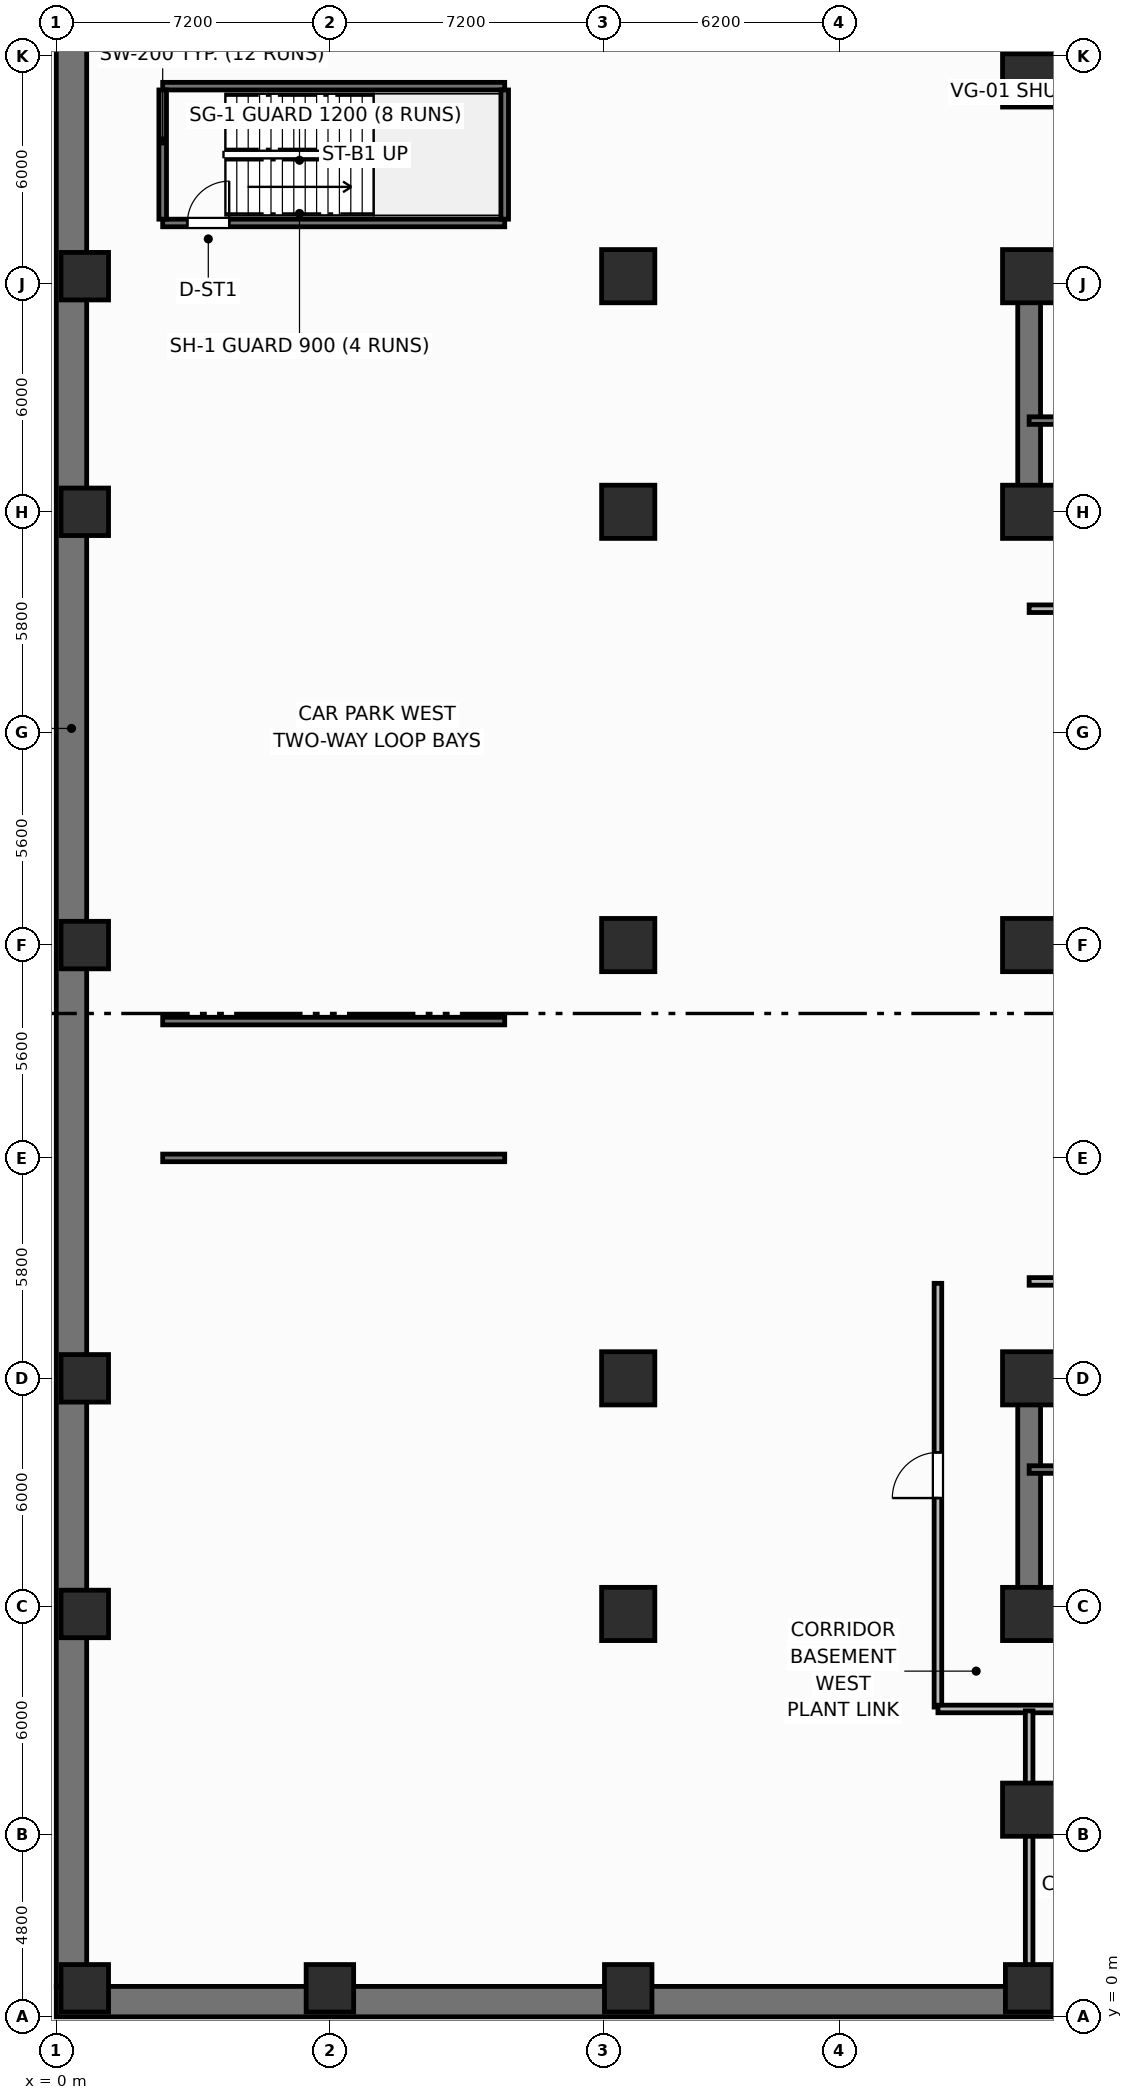
"""IFC4 building model, lengths in metres.
Left out: names, types, materials, properties, quantities, classifications, styles, units other than length and angle.
Written with IfcOpenShell. Run it as: python <this file> out.ifc"""

import sys

from ifc_helpers import new_model, si_unit, direction, frame, frame_2d, origin, origin_2d, place, context, subcontext, project, spatial, rectangle, extrude, element, fill, save


model = new_model("IFC4")
c1 = context("Model", 3, precision=1e-05, world=origin(), true_north=direction((0.0, 1.0)))
c2 = subcontext(c1, "Body", "Model", "MODEL_VIEW")
j1 = project(units=[si_unit("LENGTHUNIT", "METRE"), si_unit("PLANEANGLEUNIT", "RADIAN")], contexts=[c1])
p1 = place(None, origin())
s1 = spatial("IfcSite", under=j1, at=p1, CompositionType="ELEMENT")
p2 = place(p1, origin())
s2 = spatial("IfcBuilding", under=s1, at=p2, CompositionType="ELEMENT")
p3 = place(p2, frame((0.0, 0.0, -4.8)))
s3 = spatial("IfcBuildingStorey", under=s2, at=p3, CompositionType="ELEMENT", Elevation=-4.8)
p4 = place(p3, frame((0.0, 0.4, 0.0), z_axis=(0.0, 0.0, 1.0), x_axis=(1.0, 0.0, 0.0)))
e1 = element("IfcWall", 1, at=p4, inside=s3, PredefinedType="USERDEFINED", context=c2, shape_type="SweptSolid", body=[
    extrude(rectangle(XDim=78.4, YDim=0.8, at=frame_2d((39.2, 0.0))), origin(), (0.0, 0.0, 1.0), 4.8),
])
p5 = place(p3, frame((0.4, 0.8, 0.0), z_axis=(0.0, 0.0, 1.0), x_axis=(0.0, 1.0, 0.0)))
e2 = element("IfcWall", 2, at=p5, inside=s3, PredefinedType="USERDEFINED", context=c2, shape_type="SweptSolid", body=[
    extrude(rectangle(XDim=54.8, YDim=0.8, at=frame_2d((27.4, 0.0))), origin(), (0.0, 0.0, 1.0), 4.8),
])
p6 = place(p3, frame((52.8, 10.6, 0.0), z_axis=(0.0, 0.0, 1.0), x_axis=(-1.0, 0.0, 0.0)))
e3 = element("IfcWall", 3, at=p6, inside=s3, PredefinedType="SHEAR", context=c2, shape_type="SweptSolid", body=[
    extrude(rectangle(XDim=27.2, YDim=0.6, at=frame_2d((13.6, 0.0))), origin(), (0.0, 0.0, 1.0), 4.8),
])
p7 = place(p3, frame((25.6, 10.9, 0.0), z_axis=(0.0, 0.0, 1.0), x_axis=(0.0, 1.0, 0.0)))
e4 = element("IfcWall", 4, at=p7, inside=s3, PredefinedType="SHEAR", context=c2, shape_type="SweptSolid", body=[
    extrude(rectangle(XDim=5.6, YDim=0.6, at=frame_2d((2.8, 0.0))), origin(), (0.0, 0.0, 1.0), 4.8),
])
p8 = place(p3, frame((25.6, 16.8, 0.0), z_axis=(0.0, 0.0, 1.0), x_axis=(1.0, 0.0, 0.0)))
e5 = element("IfcWall", 5, at=p8, inside=s3, PredefinedType="SHEAR", context=c2, shape_type="SweptSolid", body=[
    extrude(rectangle(XDim=27.2, YDim=0.6, at=frame_2d((13.6, 0.0))), origin(), (0.0, 0.0, 1.0), 4.8),
])
p9 = place(p8, frame((1.9, 0.0, 0.0)))
e6 = element("IfcOpeningElement", 6, at=p9, cuts=e5, PredefinedType="OPENING", context=c2, shape_type="SweptSolid", body=[
    extrude(rectangle(XDim=1.1, YDim=2.15, at=frame_2d((0.55, 1.075))), frame((0.0, 0.31, 0.0), z_axis=(0.0, -1.0, 0.0), x_axis=(1.0, 0.0, 0.0)), (0.0, 0.0, 1.0), 0.62),
])
p10 = place(p8, frame((13.0, 0.0, 0.0)))
e7 = element("IfcOpeningElement", 7, at=p10, cuts=e5, PredefinedType="OPENING", context=c2, shape_type="SweptSolid", body=[
    extrude(rectangle(XDim=1.2, YDim=2.15, at=frame_2d((0.6, 1.075))), frame((0.0, 0.31, 0.0), z_axis=(0.0, -1.0, 0.0), x_axis=(1.0, 0.0, 0.0)), (0.0, 0.0, 1.0), 0.62),
])
p11 = place(p8, frame((20.4, 0.0, 0.0)))
e8 = element("IfcOpeningElement", 8, at=p11, cuts=e5, PredefinedType="OPENING", context=c2, shape_type="SweptSolid", body=[
    extrude(rectangle(XDim=1.3, YDim=2.2, at=frame_2d((0.65, 1.1))), frame((0.0, 0.31, 0.0), z_axis=(0.0, -1.0, 0.0), x_axis=(1.0, 0.0, 0.0)), (0.0, 0.0, 1.0), 0.62),
])
p12 = place(p8, frame((24.65, 0.0, 0.0)))
e9 = element("IfcOpeningElement", 9, at=p12, cuts=e5, PredefinedType="OPENING", context=c2, shape_type="SweptSolid", body=[
    extrude(rectangle(XDim=0.85, YDim=2.1, at=frame_2d((0.425, 1.05))), frame((0.0, 0.31, 0.0), z_axis=(0.0, -1.0, 0.0), x_axis=(1.0, 0.0, 0.0)), (0.0, 0.0, 1.0), 0.62),
])
p13 = place(p3, frame((25.6, 45.8, 0.0), z_axis=(0.0, 0.0, 1.0), x_axis=(1.0, 0.0, 0.0)))
e10 = element("IfcWall", 10, at=p13, inside=s3, PredefinedType="SHEAR", context=c2, shape_type="SweptSolid", body=[
    extrude(rectangle(XDim=27.2, YDim=0.6, at=frame_2d((13.6, 0.0))), origin(), (0.0, 0.0, 1.0), 4.8),
])
p14 = place(p3, frame((25.6, 39.9, 0.0), z_axis=(0.0, 0.0, 1.0), x_axis=(0.0, 1.0, 0.0)))
e11 = element("IfcWall", 11, at=p14, inside=s3, PredefinedType="SHEAR", context=c2, shape_type="SweptSolid", body=[
    extrude(rectangle(XDim=5.6, YDim=0.6, at=frame_2d((2.8, 0.0))), origin(), (0.0, 0.0, 1.0), 4.8),
])
p15 = place(p3, frame((52.8, 39.6, 0.0), z_axis=(0.0, 0.0, 1.0), x_axis=(-1.0, 0.0, 0.0)))
e12 = element("IfcWall", 12, at=p15, inside=s3, PredefinedType="SHEAR", context=c2, shape_type="SweptSolid", body=[
    extrude(rectangle(XDim=27.2, YDim=0.6, at=frame_2d((13.6, 0.0))), origin(), (0.0, 0.0, 1.0), 4.8),
])
p16 = place(p15, frame((24.2, 0.0, 0.0)))
e13 = element("IfcOpeningElement", 13, at=p16, cuts=e12, PredefinedType="OPENING", context=c2, shape_type="SweptSolid", body=[
    extrude(rectangle(XDim=1.1, YDim=2.15, at=frame_2d((0.55, 1.075))), frame((0.0, 0.31, 0.0), z_axis=(0.0, -1.0, 0.0), x_axis=(1.0, 0.0, 0.0)), (0.0, 0.0, 1.0), 0.62),
])
p17 = place(p15, frame((15.1, 0.0, 0.0)))
e14 = element("IfcOpeningElement", 14, at=p17, cuts=e12, PredefinedType="OPENING", context=c2, shape_type="SweptSolid", body=[
    extrude(rectangle(XDim=1.2, YDim=2.15, at=frame_2d((0.6, 1.075))), frame((0.0, 0.31, 0.0), z_axis=(0.0, -1.0, 0.0), x_axis=(1.0, 0.0, 0.0)), (0.0, 0.0, 1.0), 0.62),
])
p18 = place(p15, frame((11.6, 0.0, 0.0)))
e15 = element("IfcOpeningElement", 15, at=p18, cuts=e12, PredefinedType="OPENING", context=c2, shape_type="SweptSolid", body=[
    extrude(rectangle(XDim=0.9, YDim=2.1, at=frame_2d((0.45, 1.05))), frame((0.0, 0.31, 0.0), z_axis=(0.0, -1.0, 0.0), x_axis=(1.0, 0.0, 0.0)), (0.0, 0.0, 1.0), 0.62),
])
p19 = place(p15, frame((3.6, 0.0, 0.0)))
e16 = element("IfcOpeningElement", 16, at=p19, cuts=e12, PredefinedType="OPENING", context=c2, shape_type="SweptSolid", body=[
    extrude(rectangle(XDim=1.0, YDim=2.15, at=frame_2d((0.5, 1.075))), frame((0.0, 0.31, 0.0), z_axis=(0.0, -1.0, 0.0), x_axis=(1.0, 0.0, 0.0)), (0.0, 0.0, 1.0), 0.62),
])
for number, where, z_axis, x_axis in (
    (17, (25.6, 10.6, 0.0), (0.0, 0.0, 1.0), (1.0, 0.0, 0.0)),
    (18, (25.6, 16.8, 0.0), (0.0, 0.0, 1.0), (1.0, 0.0, 0.0)),
    (19, (25.6, 39.6, 0.0), (0.0, 0.0, 1.0), (1.0, 0.0, 0.0)),
    (20, (25.6, 45.8, 0.0), (0.0, 0.0, 1.0), (1.0, 0.0, 0.0)),
    (21, (25.6, 28.2, 0.0), (0.0, 0.0, 1.0), (1.0, 0.0, 0.0)),
):
    element("IfcColumn", number, at=place(p3, frame(where, z_axis=z_axis, x_axis=x_axis)), inside=s3, PredefinedType="COLUMN", context=c2, shape_type="SweptSolid", body=[
        extrude(rectangle(XDim=1.4, YDim=1.4, at=origin_2d()), origin(), (0.0, 0.0, 1.0), 4.8),
    ])
for number, where, z_axis, x_axis in (
    (22, (0.75, 0.75, 0.0), (0.0, 0.0, 1.0), (1.0, 0.0, 0.0)),
    (23, (0.75, 10.6, 0.0), (0.0, 0.0, 1.0), (1.0, 0.0, 0.0)),
    (24, (0.75, 16.8, 0.0), (0.0, 0.0, 1.0), (1.0, 0.0, 0.0)),
    (25, (0.75, 28.2, 0.0), (0.0, 0.0, 1.0), (1.0, 0.0, 0.0)),
    (26, (0.75, 39.6, 0.0), (0.0, 0.0, 1.0), (1.0, 0.0, 0.0)),
    (27, (0.75, 45.8, 0.0), (0.0, 0.0, 1.0), (1.0, 0.0, 0.0)),
    (28, (7.2, 0.75, 0.0), (0.0, 0.0, 1.0), (1.0, 0.0, 0.0)),
    (29, (15.05, 0.75, 0.0), (0.0, 0.0, 1.0), (1.0, 0.0, 0.0)),
    (30, (25.6, 0.75, 0.0), (0.0, 0.0, 1.0), (1.0, 0.0, 0.0)),
):
    element("IfcColumn", number, at=place(p3, frame(where, z_axis=z_axis, x_axis=x_axis)), inside=s3, PredefinedType="COLUMN", context=c2, shape_type="SweptSolid", body=[
        extrude(rectangle(XDim=1.25, YDim=1.25, at=origin_2d()), origin(), (0.0, 0.0, 1.0), 4.8),
    ])
for number, where, z_axis, x_axis in (
    (31, (25.6, 5.45, 0.0), (0.0, 0.0, 1.0), (1.0, 0.0, 0.0)),
    (32, (25.6, 50.95, 0.0), (0.0, 0.0, 1.0), (1.0, 0.0, 0.0)),
    (33, (15.05, 10.6, 0.0), (0.0, 0.0, 1.0), (1.0, 0.0, 0.0)),
    (34, (15.05, 16.8, 0.0), (0.0, 0.0, 1.0), (1.0, 0.0, 0.0)),
    (35, (15.05, 28.2, 0.0), (0.0, 0.0, 1.0), (1.0, 0.0, 0.0)),
    (36, (15.05, 39.6, 0.0), (0.0, 0.0, 1.0), (1.0, 0.0, 0.0)),
    (37, (15.05, 45.8, 0.0), (0.0, 0.0, 1.0), (1.0, 0.0, 0.0)),
):
    element("IfcColumn", number, at=place(p3, frame(where, z_axis=z_axis, x_axis=x_axis)), inside=s3, PredefinedType="COLUMN", context=c2, shape_type="SweptSolid", body=[
        extrude(rectangle(XDim=1.4, YDim=1.4, at=origin_2d()), origin(), (0.0, 0.0, 1.0), 4.8),
    ])
for number, where, z_axis, x_axis in (
    (38, (2.8, 22.6, 0.0), (0.0, 0.0, 1.0), (1.0, 0.0, 0.0)),
    (39, (2.8, 26.2, 0.0), (0.0, 0.0, 1.0), (1.0, 0.0, 0.0)),
):
    element("IfcWall", number, at=place(p3, frame(where, z_axis=z_axis, x_axis=x_axis)), inside=s3, PredefinedType="SHEAR", context=c2, shape_type="SweptSolid", body=[
        extrude(rectangle(XDim=9.0, YDim=0.2, at=frame_2d((4.5, 0.0))), origin(), (0.0, 0.0, 1.0), 4.8),
    ])
p20 = place(p3, frame((25.6, 14.4, 0.0), z_axis=(0.0, 0.0, 1.0), x_axis=(1.0, 0.0, 0.0)))
e40 = element("IfcWall", 40, at=p20, inside=s3, PredefinedType="SHEAR", context=c2, shape_type="SweptSolid", body=[
    extrude(rectangle(XDim=9.55, YDim=0.2, at=frame_2d((4.775, 0.0))), origin(), (0.0, 0.0, 1.0), 4.8),
])
p21 = place(p20, frame((1.05, 0.0, 0.0)))
e41 = element("IfcOpeningElement", 41, at=p21, cuts=e40, PredefinedType="OPENING", context=c2, shape_type="SweptSolid", body=[
    extrude(rectangle(XDim=1.1, YDim=2.15, at=frame_2d((0.55, 1.075))), frame((0.0, 0.11, 0.0), z_axis=(0.0, -1.0, 0.0), x_axis=(1.0, 0.0, 0.0)), (0.0, 0.0, 1.0), 0.22),
])
p22 = place(p3, frame((35.15, 42.0, 0.0), z_axis=(0.0, 0.0, 1.0), x_axis=(-1.0, 0.0, 0.0)))
e42 = element("IfcWall", 42, at=p22, inside=s3, PredefinedType="SHEAR", context=c2, shape_type="SweptSolid", body=[
    extrude(rectangle(XDim=9.55, YDim=0.2, at=frame_2d((4.775, 0.0))), origin(), (0.0, 0.0, 1.0), 4.8),
])
p23 = place(p22, frame((7.25, 0.0, 0.0)))
e43 = element("IfcOpeningElement", 43, at=p23, cuts=e42, PredefinedType="OPENING", context=c2, shape_type="SweptSolid", body=[
    extrude(rectangle(XDim=1.1, YDim=2.15, at=frame_2d((0.55, 1.075))), frame((0.0, 0.11, 0.0), z_axis=(0.0, -1.0, 0.0), x_axis=(1.0, 0.0, 0.0)), (0.0, 0.0, 1.0), 0.22),
])
p24 = place(p3, frame((2.8, 47.2, 0.0), z_axis=(0.0, 0.0, 1.0), x_axis=(1.0, 0.0, 0.0)))
e44 = element("IfcWall", 44, at=p24, inside=s3, PredefinedType="SHEAR", context=c2, shape_type="SweptSolid", body=[
    extrude(rectangle(XDim=9.0, YDim=0.2, at=frame_2d((4.5, 0.0))), origin(), (0.0, 0.0, 1.0), 4.8),
])
p25 = place(p24, frame((0.65, 0.0, 0.0)))
e45 = element("IfcOpeningElement", 45, at=p25, cuts=e44, PredefinedType="OPENING", context=c2, shape_type="SweptSolid", body=[
    extrude(rectangle(XDim=1.1, YDim=2.15, at=frame_2d((0.55, 1.075))), frame((0.0, 0.11, 0.0), z_axis=(0.0, -1.0, 0.0), x_axis=(1.0, 0.0, 0.0)), (0.0, 0.0, 1.0), 0.22),
])
p26 = place(p3, frame((11.8, 50.8, 0.0), z_axis=(0.0, 0.0, 1.0), x_axis=(-1.0, 0.0, 0.0)))
e46 = element("IfcWall", 46, at=p26, inside=s3, PredefinedType="SHEAR", context=c2, shape_type="SweptSolid", body=[
    extrude(rectangle(XDim=9.0, YDim=0.2, at=frame_2d((4.5, 0.0))), origin(), (0.0, 0.0, 1.0), 4.8),
])
for number, where, z_axis, x_axis in (
    (47, (2.8, 47.3, 0.0), (0.0, 0.0, 1.0), (0.0, 1.0, 0.0)),
    (48, (11.8, 47.3, 0.0), (0.0, 0.0, 1.0), (0.0, 1.0, 0.0)),
):
    element("IfcWall", number, at=place(p3, frame(where, z_axis=z_axis, x_axis=x_axis)), inside=s3, PredefinedType="SHEAR", context=c2, shape_type="SweptSolid", body=[
        extrude(rectangle(XDim=3.4, YDim=0.2, at=frame_2d((1.7, 0.0))), origin(), (0.0, 0.0, 1.0), 4.8),
    ])
p27 = place(p3, frame((25.6, 19.35, 0.0), z_axis=(0.0, 0.0, 1.0), x_axis=(1.0, 0.0, 0.0)))
e49 = element("IfcWall", 49, at=p27, inside=s3, PredefinedType="PARTITIONING", context=c2, shape_type="SweptSolid", body=[
    extrude(rectangle(XDim=27.2, YDim=0.2, at=frame_2d((13.6, 0.0))), origin(), (0.0, 0.0, 1.0), 3.67),
])
p28 = place(p27, frame((6.0, 0.0, 0.0)))
e50 = element("IfcOpeningElement", 50, at=p28, cuts=e49, PredefinedType="OPENING", context=c2, shape_type="SweptSolid", body=[
    extrude(rectangle(XDim=1.2, YDim=2.15, at=frame_2d((0.6, 1.075))), frame((0.0, 0.11, 0.0), z_axis=(0.0, -1.0, 0.0), x_axis=(1.0, 0.0, 0.0)), (0.0, 0.0, 1.0), 0.22),
])
p29 = place(p3, frame((52.8, 37.05, 0.0), z_axis=(0.0, 0.0, 1.0), x_axis=(-1.0, 0.0, 0.0)))
e51 = element("IfcWall", 51, at=p29, inside=s3, PredefinedType="PARTITIONING", context=c2, shape_type="SweptSolid", body=[
    extrude(rectangle(XDim=27.2, YDim=0.2, at=frame_2d((13.6, 0.0))), origin(), (0.0, 0.0, 1.0), 3.67),
])
p30 = place(p29, frame((6.0, 0.0, 0.0)))
e52 = element("IfcOpeningElement", 52, at=p30, cuts=e51, PredefinedType="OPENING", context=c2, shape_type="SweptSolid", body=[
    extrude(rectangle(XDim=1.2, YDim=2.15, at=frame_2d((0.6, 1.075))), frame((0.0, 0.11, 0.0), z_axis=(0.0, -1.0, 0.0), x_axis=(1.0, 0.0, 0.0)), (0.0, 0.0, 1.0), 0.22),
])
p31 = place(p3, frame((23.2, 8.15, 0.0), z_axis=(0.0, 0.0, 1.0), x_axis=(0.0, 1.0, 0.0)))
e53 = element("IfcWall", 53, at=p31, inside=s3, PredefinedType="PARTITIONING", context=c2, shape_type="SweptSolid", body=[
    extrude(rectangle(XDim=11.15, YDim=0.2, at=frame_2d((5.575, 0.0))), origin(), (0.0, 0.0, 1.0), 3.67),
])
p32 = place(p31, frame((5.5, 0.0, 0.0)))
e54 = element("IfcOpeningElement", 54, at=p32, cuts=e53, PredefinedType="OPENING", context=c2, shape_type="SweptSolid", body=[
    extrude(rectangle(XDim=1.2, YDim=2.15, at=frame_2d((0.6, 1.075))), frame((0.0, 0.11, 0.0), z_axis=(0.0, -1.0, 0.0), x_axis=(1.0, 0.0, 0.0)), (0.0, 0.0, 1.0), 0.22),
])
p33 = place(p3, frame((23.2, 8.1, 0.0), z_axis=(0.0, 0.0, 1.0), x_axis=(1.0, 0.0, 0.0)))
e55 = element("IfcWall", 55, at=p33, inside=s3, PredefinedType="PARTITIONING", context=c2, shape_type="SweptSolid", body=[
    extrude(rectangle(XDim=29.65, YDim=0.2, at=frame_2d((14.825, 0.0))), origin(), (0.0, 0.0, 1.0), 3.67),
])
p34 = place(p33, frame((5.2, 0.0, 0.0)))
e56 = element("IfcOpeningElement", 56, at=p34, cuts=e55, PredefinedType="OPENING", context=c2, shape_type="SweptSolid", body=[
    extrude(rectangle(XDim=1.2, YDim=2.15, at=frame_2d((0.6, 1.075))), frame((0.0, 0.11, 0.0), z_axis=(0.0, -1.0, 0.0), x_axis=(1.0, 0.0, 0.0)), (0.0, 0.0, 1.0), 0.22),
])
p35 = place(p33, frame((14.2, 0.0, 0.0)))
e57 = element("IfcOpeningElement", 57, at=p35, cuts=e55, PredefinedType="OPENING", context=c2, shape_type="SweptSolid", body=[
    extrude(rectangle(XDim=1.2, YDim=2.15, at=frame_2d((0.6, 1.075))), frame((0.0, 0.11, 0.0), z_axis=(0.0, -1.0, 0.0), x_axis=(1.0, 0.0, 0.0)), (0.0, 0.0, 1.0), 0.22),
])
p36 = place(p33, frame((23.2, 0.0, 0.0)))
e58 = element("IfcOpeningElement", 58, at=p36, cuts=e55, PredefinedType="OPENING", context=c2, shape_type="SweptSolid", body=[
    extrude(rectangle(XDim=1.2, YDim=2.15, at=frame_2d((0.6, 1.075))), frame((0.0, 0.11, 0.0), z_axis=(0.0, -1.0, 0.0), x_axis=(1.0, 0.0, 0.0)), (0.0, 0.0, 1.0), 0.22),
])
p37 = place(p3, frame((25.6, 0.85, 0.0), z_axis=(0.0, 0.0, 1.0), x_axis=(0.0, 1.0, 0.0)))
e59 = element("IfcWall", 59, at=p37, inside=s3, PredefinedType="PARTITIONING", context=c2, shape_type="SweptSolid", body=[
    extrude(rectangle(XDim=7.2, YDim=0.2, at=frame_2d((3.6, 0.0))), origin(), (0.0, 0.0, 1.0), 3.67),
])
p38 = place(p25, origin())
e60 = element("IfcDoor", 60, at=p38, inside=s3, OperationType="SINGLE_SWING_RIGHT", PredefinedType="DOOR", context=c2, shape_type="SweptSolid", body=[
    extrude(rectangle(XDim=1.1, YDim=2.15, at=frame_2d((0.55, 1.075))), frame((0.0, 0.025, 0.0), z_axis=(0.0, -1.0, 0.0), x_axis=(1.0, 0.0, 0.0)), (0.0, 0.0, 1.0), 0.05),
])
fill(e45, e60)
p39 = place(p32, origin())
e61 = element("IfcDoor", 61, at=p39, inside=s3, OperationType="SINGLE_SWING_LEFT", PredefinedType="DOOR", context=c2, shape_type="SweptSolid", body=[
    extrude(rectangle(XDim=1.2, YDim=2.15, at=frame_2d((0.6, 1.075))), frame((0.0, 0.025, 0.0), z_axis=(0.0, -1.0, 0.0), x_axis=(1.0, 0.0, 0.0)), (0.0, 0.0, 1.0), 0.05),
])
fill(e54, e61)
save(model, sys.argv[1])
